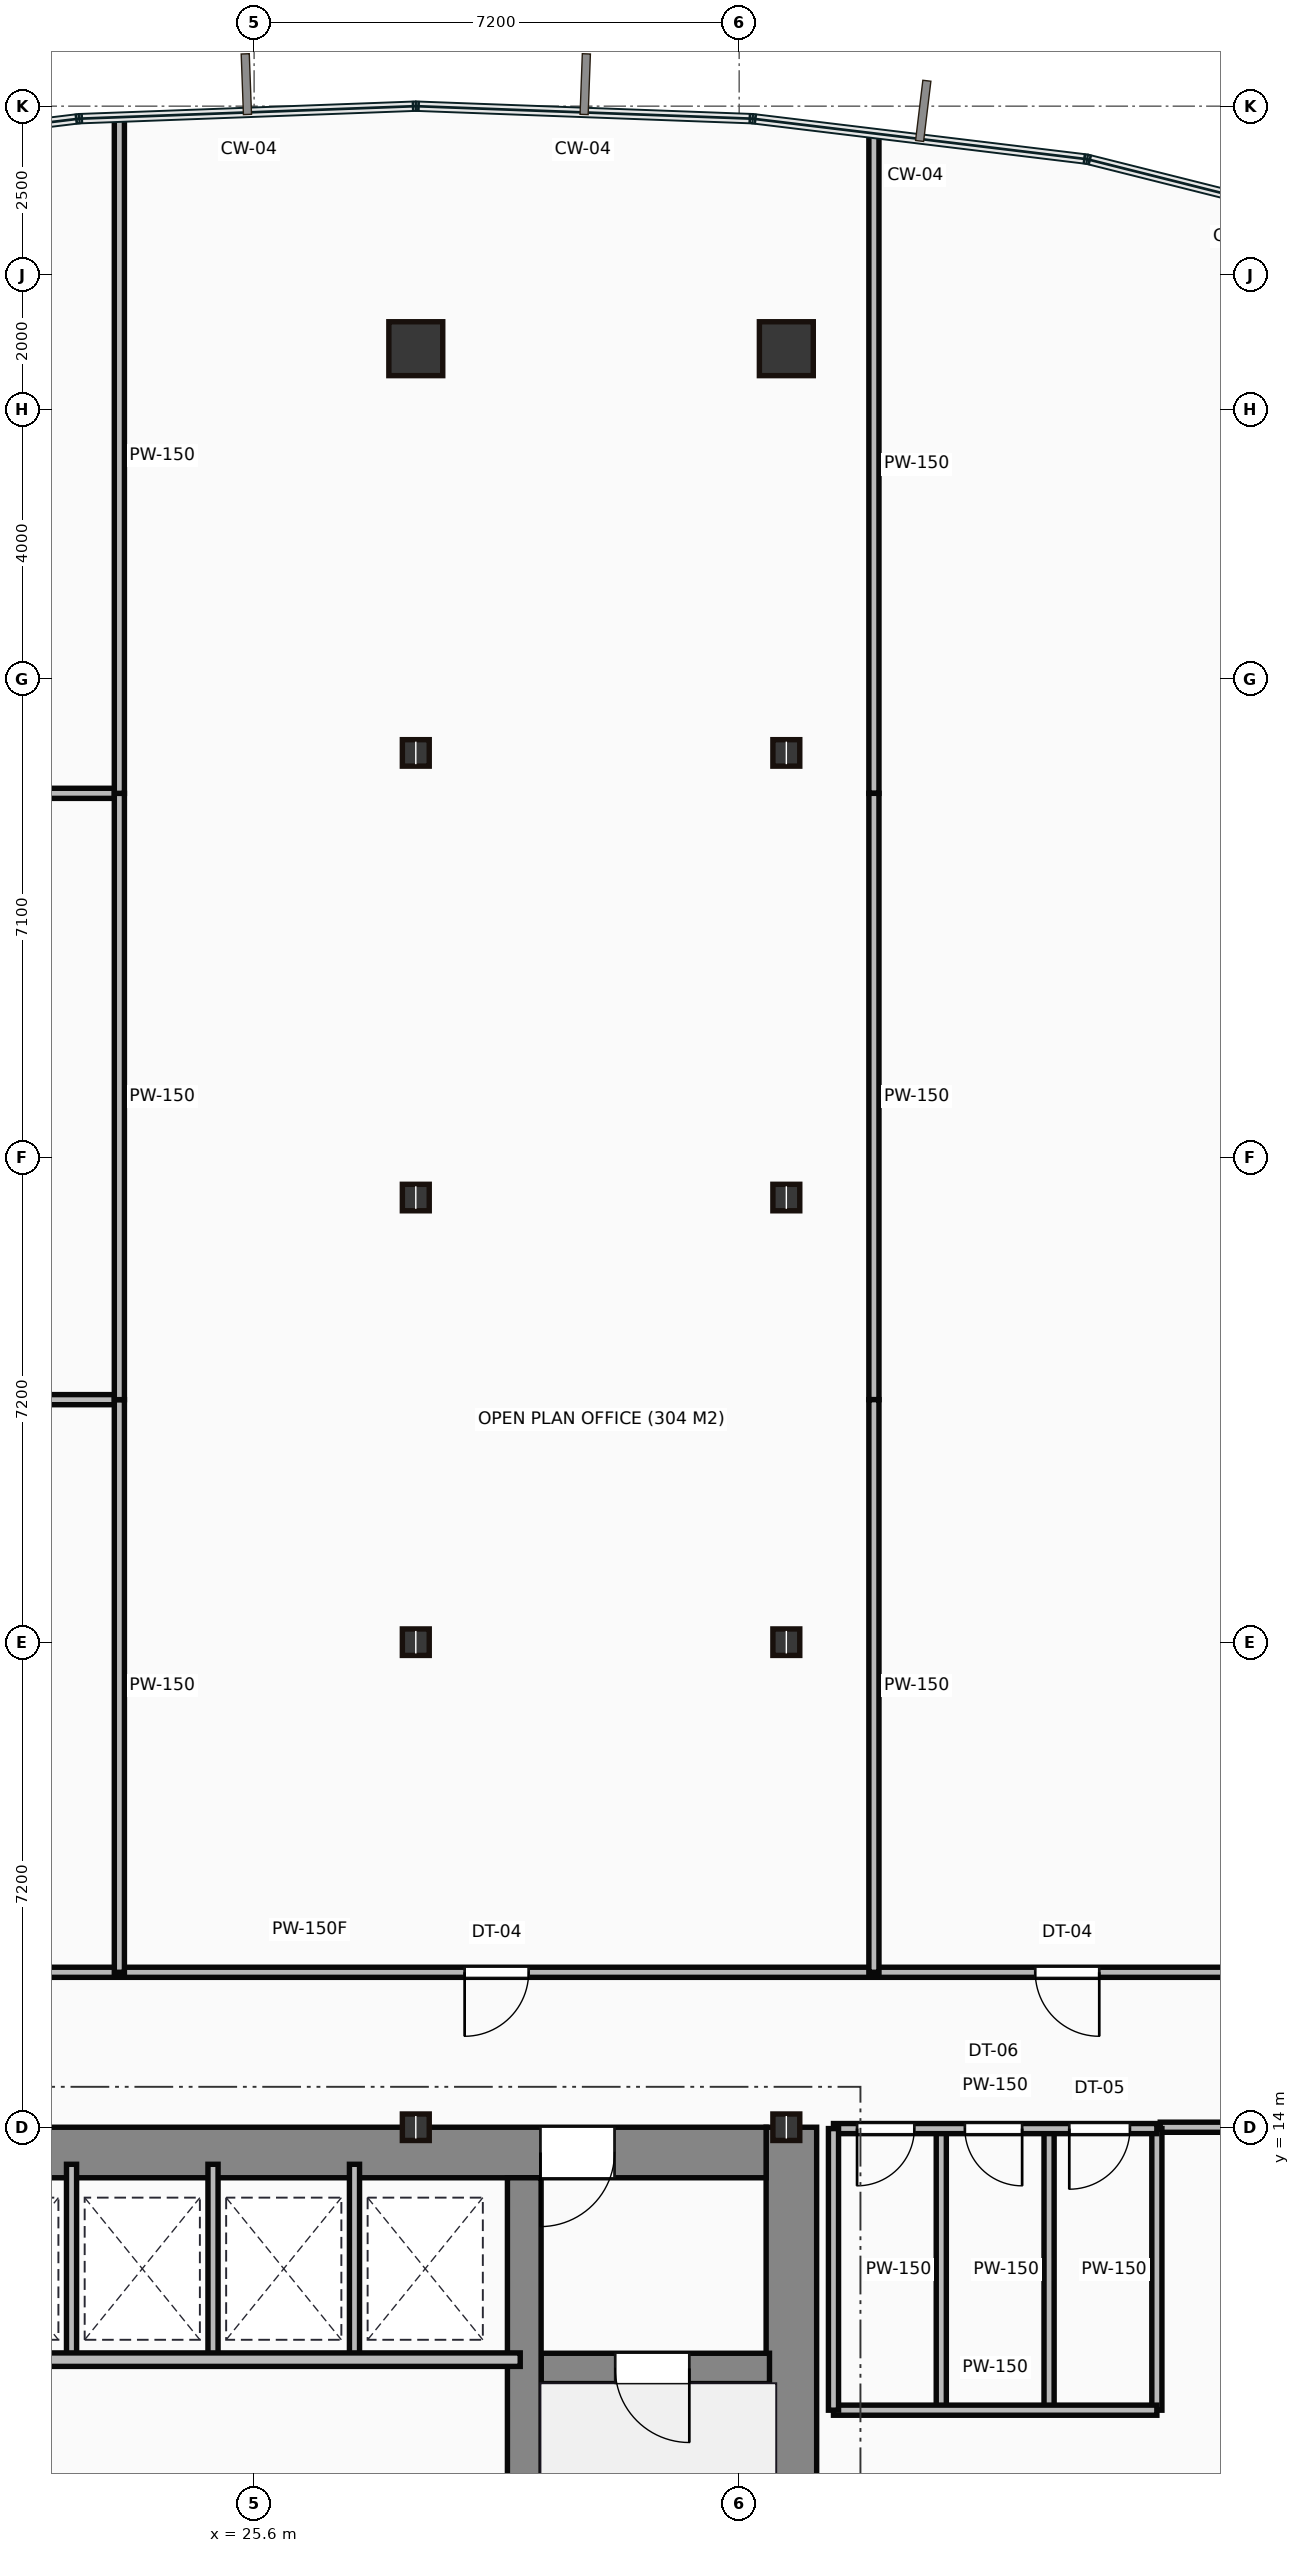
"""IFC4 building model, lengths in metres.
Left out: names, types, materials, properties, quantities, classifications, styles, units other than length and angle.
Written with IfcOpenShell. Run it as: python <this file> out.ifc"""

import sys

from ifc_helpers import new_model, si_unit, direction, frame, frame_2d, origin, origin_2d, place, context, subcontext, project, spatial, rectangle, hollow_rectangle, i_section, extrude, source, transform, mapped, element, fill, save


model = new_model("IFC4")
c1 = context("Model", 3, precision=1e-05, world=origin(), true_north=direction((0.0, 1.0)))
c2 = subcontext(c1, "Body", "Model", "MODEL_VIEW")
j1 = project(units=[si_unit("LENGTHUNIT", "METRE"), si_unit("PLANEANGLEUNIT", "RADIAN")], contexts=[c1])
p1 = place(None, origin())
s1 = spatial("IfcSite", under=j1, at=p1, CompositionType="ELEMENT")
p2 = place(p1, origin())
s2 = spatial("IfcBuilding", under=s1, at=p2, CompositionType="ELEMENT")
p3 = place(p2, frame((0.0, 0.0, 125.15)))
s3 = spatial("IfcBuildingStorey", under=s2, at=p3, CompositionType="ELEMENT", Elevation=125.15)
m1 = source(origin(), c2, "Body", "SweptSolid", [
    extrude(rectangle(XDim=13.1, YDim=0.75, at=frame_2d((6.55, 0.0))), origin(), (0.0, 0.0, 1.0), 3.65),
])
p4 = place(p3, frame((33.575, 0.9, 0.0), z_axis=(0.0, 0.0, 1.0), x_axis=(0.0, 1.0, 0.0)))
e1 = element("IfcWall", 1, at=p4, inside=s3, PredefinedType="SHEAR", context=c2, shape_type="MappedRepresentation", body=[
    mapped(m1, transform((0.0, 0.0, 0.0))),
])
m2 = source(origin(), c2, "Body", "SweptSolid", [
    extrude(rectangle(XDim=12.6, YDim=0.75, at=frame_2d((6.3, 0.0))), origin(), (0.0, 0.0, 1.0), 3.65),
])
p5 = place(p3, frame((20.6, 13.625, 0.0), z_axis=(0.0, 0.0, 1.0), x_axis=(1.0, 0.0, 0.0)))
e2 = element("IfcWall", 2, at=p5, inside=s3, PredefinedType="SHEAR", context=c2, shape_type="MappedRepresentation", body=[
    mapped(m2, transform((0.0, 0.0, 0.0))),
])
p6 = place(p5, frame((9.25, 0.0, 0.0)))
e3 = element("IfcOpeningElement", 3, at=p6, cuts=e2, PredefinedType="OPENING", context=c2, shape_type="SweptSolid", body=[
    extrude(rectangle(XDim=1.1, YDim=2.15, at=frame_2d((0.55, 1.075))), frame((0.0, 0.385, 0.0), z_axis=(0.0, -1.0, 0.0), x_axis=(1.0, 0.0, 0.0)), (0.0, 0.0, 1.0), 0.77),
])
m3 = source(origin(), c2, "Body", "SweptSolid", [
    extrude(rectangle(XDim=12.35, YDim=0.5, at=frame_2d((6.175, 0.0))), origin(), (0.0, 0.0, 1.0), 3.65),
])
p7 = place(p3, frame((29.61, 0.9, 0.0), z_axis=(0.0, 0.0, 1.0), x_axis=(0.0, 1.0, 0.0)))
e4 = element("IfcWall", 4, at=p7, inside=s3, PredefinedType="SHEAR", context=c2, shape_type="MappedRepresentation", body=[
    mapped(m3, transform((0.0, 0.0, 0.0))),
])
m4 = source(origin(), c2, "Body", "SweptSolid", [
    extrude(rectangle(XDim=3.39, YDim=0.45, at=frame_2d((1.695, 0.0))), origin(), (0.0, 0.0, 1.0), 3.65),
])
p8 = place(p3, frame((29.86, 10.42, 0.0), z_axis=(0.0, 0.0, 1.0), x_axis=(1.0, 0.0, 0.0)))
e5 = element("IfcWall", 5, at=p8, inside=s3, PredefinedType="SHEAR", context=c2, shape_type="MappedRepresentation", body=[
    mapped(m4, transform((0.0, 0.0, 0.0))),
])
p9 = place(p8, frame((1.1, 0.0, 0.0)))
e6 = element("IfcOpeningElement", 6, at=p9, cuts=e5, PredefinedType="OPENING", context=c2, shape_type="SweptSolid", body=[
    extrude(rectangle(XDim=1.1, YDim=2.15, at=frame_2d((0.55, 1.075))), frame((0.0, 0.235, 0.0), z_axis=(0.0, -1.0, 0.0), x_axis=(1.0, 0.0, 0.0)), (0.0, 0.0, 1.0), 0.47),
])
m5 = source(origin(), c2, "Body", "SweptSolid", [
    extrude(i_section(OverallWidth=0.399, OverallDepth=0.393, WebThickness=0.023, FlangeThickness=0.037, at=origin_2d()), origin(), (0.0, 0.0, 1.0), 3.65),
])
for number, where, z_axis, x_axis in (
    (7, (28.0, 14.0, 0.0), (0.0, 0.0, 1.0), (1.0, 0.0, 0.0)),
    (8, (28.0, 21.2, 0.0), (0.0, 0.0, 1.0), (1.0, 0.0, 0.0)),
    (9, (28.0, 27.8, 0.0), (0.0, 0.0, 1.0), (1.0, 0.0, 0.0)),
    (10, (28.0, 34.4, 0.0), (0.0, 0.0, 1.0), (1.0, 0.0, 0.0)),
):
    element("IfcColumn", number, at=place(p3, frame(where, z_axis=z_axis, x_axis=x_axis)), inside=s3, PredefinedType="COLUMN", context=c2, shape_type="MappedRepresentation", body=[
        mapped(m5, transform((0.0, 0.0, 0.0))),
    ])
m6 = source(origin(), c2, "Body", "SweptSolid", [
    extrude(hollow_rectangle(XDim=0.8, YDim=0.8, WallThickness=0.04, at=origin_2d()), origin(), (0.0, 0.0, 1.0), 3.65),
])
p10 = place(p3, frame((28.0, 40.4, 0.0), z_axis=(0.0, 0.0, 1.0), x_axis=(1.0, 0.0, 0.0)))
e11 = element("IfcColumn", 11, at=p10, inside=s3, PredefinedType="COLUMN", context=c2, shape_type="MappedRepresentation", body=[
    mapped(m6, transform((0.0, 0.0, 0.0))),
])
for number, where, z_axis, x_axis in (
    (12, (33.5, 14.0, 0.0), (0.0, 0.0, 1.0), (1.0, 0.0, 0.0)),
    (13, (33.5, 21.2, 0.0), (0.0, 0.0, 1.0), (1.0, 0.0, 0.0)),
    (14, (33.5, 27.8, 0.0), (0.0, 0.0, 1.0), (1.0, 0.0, 0.0)),
    (15, (33.5, 34.4, 0.0), (0.0, 0.0, 1.0), (1.0, 0.0, 0.0)),
):
    element("IfcColumn", number, at=place(p3, frame(where, z_axis=z_axis, x_axis=x_axis)), inside=s3, PredefinedType="COLUMN", context=c2, shape_type="MappedRepresentation", body=[
        mapped(m5, transform((0.0, 0.0, 0.0))),
    ])
p11 = place(p3, frame((33.5, 40.4, 0.0), z_axis=(0.0, 0.0, 1.0), x_axis=(1.0, 0.0, 0.0)))
e16 = element("IfcColumn", 16, at=p11, inside=s3, PredefinedType="COLUMN", context=c2, shape_type="MappedRepresentation", body=[
    mapped(m6, transform((0.0, 0.0, 0.0))),
])
m7 = source(origin(), c2, "Body", "SweptSolid", [
    extrude(rectangle(XDim=8.8, YDim=0.2, at=frame_2d((4.4, 0.0))), origin(), (0.0, 0.0, 1.0), 3.4),
])
p12 = place(p3, frame((20.75, 10.55, 0.0), z_axis=(0.0, 0.0, 1.0), x_axis=(1.0, 0.0, 0.0)))
e17 = element("IfcWall", 17, at=p12, inside=s3, PredefinedType="PARTITIONING", context=c2, shape_type="MappedRepresentation", body=[
    mapped(m7, transform((0.0, 0.0, 0.0))),
])
m8 = source(origin(), c2, "Body", "SweptSolid", [
    extrude(rectangle(XDim=2.85, YDim=0.15, at=frame_2d((1.425, 0.0))), origin(), (0.0, 0.0, 1.0), 3.4),
])
for number, where, z_axis, x_axis in (
    (18, (22.89, 10.6, 0.0), (0.0, 0.0, 1.0), (0.0, 1.0, 0.0)),
    (19, (24.99, 10.6, 0.0), (0.0, 0.0, 1.0), (0.0, 1.0, 0.0)),
    (20, (27.09, 10.6, 0.0), (0.0, 0.0, 1.0), (0.0, 1.0, 0.0)),
):
    element("IfcWall", number, at=place(p3, frame(where, z_axis=z_axis, x_axis=x_axis)), inside=s3, PredefinedType="PARTITIONING", context=c2, shape_type="MappedRepresentation", body=[
        mapped(m8, transform((0.0, 0.0, 0.0))),
    ])
m9 = source(origin(), c2, "Body", "SweptSolid", [
    extrude(rectangle(XDim=4.8, YDim=0.15, at=frame_2d((2.4, 0.0))), origin(), (0.0, 0.0, 1.0), 2.702),
])
p13 = place(p3, frame((34.2, 13.98, 0.0), z_axis=(0.0, 0.0, 1.0), x_axis=(1.0, 0.0, 0.0)))
e21 = element("IfcWall", 21, at=p13, inside=s3, PredefinedType="PARTITIONING", context=c2, shape_type="MappedRepresentation", body=[
    mapped(m9, transform((0.0, 0.0, 0.0))),
])
p14 = place(p13, frame((0.35, 0.0, 0.0)))
e22 = element("IfcOpeningElement", 22, at=p14, cuts=e21, PredefinedType="OPENING", context=c2, shape_type="SweptSolid", body=[
    extrude(rectangle(XDim=0.85, YDim=2.1, at=frame_2d((0.425, 1.05))), frame((0.0, 0.085, 0.0), z_axis=(0.0, -1.0, 0.0), x_axis=(1.0, 0.0, 0.0)), (0.0, 0.0, 1.0), 0.17),
])
p15 = place(p13, frame((1.95, 0.0, 0.0)))
e23 = element("IfcOpeningElement", 23, at=p15, cuts=e21, PredefinedType="OPENING", context=c2, shape_type="SweptSolid", body=[
    extrude(rectangle(XDim=0.85, YDim=2.1, at=frame_2d((0.425, 1.05))), frame((0.0, 0.085, 0.0), z_axis=(0.0, -1.0, 0.0), x_axis=(1.0, 0.0, 0.0)), (0.0, 0.0, 1.0), 0.17),
])
p16 = place(p13, frame((3.5, 0.0, 0.0)))
e24 = element("IfcOpeningElement", 24, at=p16, cuts=e21, PredefinedType="OPENING", context=c2, shape_type="SweptSolid", body=[
    extrude(rectangle(XDim=0.9, YDim=2.1, at=frame_2d((0.45, 1.05))), frame((0.0, 0.085, 0.0), z_axis=(0.0, -1.0, 0.0), x_axis=(1.0, 0.0, 0.0)), (0.0, 0.0, 1.0), 0.17),
])
m10 = source(origin(), c2, "Body", "SweptSolid", [
    extrude(rectangle(XDim=4.8, YDim=0.15, at=frame_2d((2.4, 0.0))), origin(), (0.0, 0.0, 1.0), 3.4),
])
p17 = place(p3, frame((34.2, 9.8, 0.0), z_axis=(0.0, 0.0, 1.0), x_axis=(1.0, 0.0, 0.0)))
e25 = element("IfcWall", 25, at=p17, inside=s3, PredefinedType="PARTITIONING", context=c2, shape_type="MappedRepresentation", body=[
    mapped(m10, transform((0.0, 0.0, 0.0))),
])
m11 = source(origin(), c2, "Body", "SweptSolid", [
    extrude(rectangle(XDim=4.18, YDim=0.15, at=frame_2d((2.09, 0.0))), origin(), (0.0, 0.0, 1.0), 3.4),
])
for number, where, z_axis, x_axis in (
    (26, (39.0, 9.8, 0.0), (0.0, 0.0, 1.0), (0.0, 1.0, 0.0)),
    (27, (34.2, 9.8, 0.0), (0.0, 0.0, 1.0), (0.0, 1.0, 0.0)),
    (28, (35.8, 9.8, 0.0), (0.0, 0.0, 1.0), (0.0, 1.0, 0.0)),
    (29, (37.4, 9.8, 0.0), (0.0, 0.0, 1.0), (0.0, 1.0, 0.0)),
):
    element("IfcWall", number, at=place(p3, frame(where, z_axis=z_axis, x_axis=x_axis)), inside=s3, PredefinedType="PARTITIONING", context=c2, shape_type="MappedRepresentation", body=[
        mapped(m11, transform((0.0, 0.0, 0.0))),
    ])
m12 = source(origin(), c2, "Body", "SweptSolid", [
    extrude(rectangle(XDim=28.75, YDim=0.15, at=frame_2d((14.375, 0.0))), origin(), (0.0, 0.0, 1.0), 3.4),
])
p18 = place(p3, frame((12.05, 16.3, 0.0), z_axis=(0.0, 0.0, 1.0), x_axis=(1.0, 0.0, 0.0)))
e30 = element("IfcWall", 30, at=p18, inside=s3, PredefinedType="PARTITIONING", context=c2, shape_type="MappedRepresentation", body=[
    mapped(m12, transform((0.0, 0.0, 0.0))),
])
p19 = place(p18, frame((5.43, 0.0, 0.0)))
e31 = element("IfcOpeningElement", 31, at=p19, cuts=e30, PredefinedType="OPENING", context=c2, shape_type="SweptSolid", body=[
    extrude(rectangle(XDim=0.95, YDim=2.15, at=frame_2d((0.475, 1.075))), frame((0.0, 0.085, 0.0), z_axis=(0.0, -1.0, 0.0), x_axis=(1.0, 0.0, 0.0)), (0.0, 0.0, 1.0), 0.17),
])
p20 = place(p18, frame((16.675, 0.0, 0.0)))
e32 = element("IfcOpeningElement", 32, at=p20, cuts=e30, PredefinedType="OPENING", context=c2, shape_type="SweptSolid", body=[
    extrude(rectangle(XDim=0.95, YDim=2.15, at=frame_2d((0.475, 1.075))), frame((0.0, 0.085, 0.0), z_axis=(0.0, -1.0, 0.0), x_axis=(1.0, 0.0, 0.0)), (0.0, 0.0, 1.0), 0.17),
])
p21 = place(p18, frame((25.145, 0.0, 0.0)))
e33 = element("IfcOpeningElement", 33, at=p21, cuts=e30, PredefinedType="OPENING", context=c2, shape_type="SweptSolid", body=[
    extrude(rectangle(XDim=0.95, YDim=2.15, at=frame_2d((0.475, 1.075))), frame((0.0, 0.085, 0.0), z_axis=(0.0, -1.0, 0.0), x_axis=(1.0, 0.0, 0.0)), (0.0, 0.0, 1.0), 0.17),
])
m13 = source(origin(), c2, "Body", "SweptSolid", [
    extrude(rectangle(XDim=1.75, YDim=0.15, at=frame_2d((0.875, 0.0))), origin(), (0.0, 0.0, 1.0), 2.702),
])
p22 = place(p3, frame((40.8, 14.0, 0.0), z_axis=(0.0, 0.0, 1.0), x_axis=(-1.0, 0.0, 0.0)))
e34 = element("IfcWall", 34, at=p22, inside=s3, PredefinedType="PARTITIONING", context=c2, shape_type="MappedRepresentation", body=[
    mapped(m13, transform((0.0, 0.0, 0.0))),
])
m14 = source(origin(), c2, "Body", "SweptSolid", [
    extrude(rectangle(XDim=11.55, YDim=0.15, at=frame_2d((5.775, 0.0))), origin(), (0.0, 0.0, 1.0), 3.4),
])
for number, where, z_axis, x_axis in (
    (35, (12.05, 24.8, 0.0), (0.0, 0.0, 1.0), (1.0, 0.0, 0.0)),
    (36, (23.6, 33.8, 0.0), (0.0, 0.0, 1.0), (-1.0, 0.0, 0.0)),
):
    element("IfcWall", number, at=place(p3, frame(where, z_axis=z_axis, x_axis=x_axis)), inside=s3, PredefinedType="PARTITIONING", context=c2, shape_type="MappedRepresentation", body=[
        mapped(m14, transform((0.0, 0.0, 0.0))),
    ])
m15 = source(origin(), c2, "Body", "SweptSolid", [
    extrude(rectangle(XDim=8.5, YDim=0.15, at=frame_2d((4.25, 0.0))), origin(), (0.0, 0.0, 1.0), 3.4),
])
p23 = place(p3, frame((23.6, 24.8, 0.0), z_axis=(0.0, 0.0, 1.0), x_axis=(0.0, -1.0, 0.0)))
e37 = element("IfcWall", 37, at=p23, inside=s3, PredefinedType="PARTITIONING", context=c2, shape_type="MappedRepresentation", body=[
    mapped(m15, transform((0.0, 0.0, 0.0))),
])
m16 = source(origin(), c2, "Body", "SweptSolid", [
    extrude(rectangle(XDim=9.0, YDim=0.15, at=frame_2d((4.5, 0.0))), origin(), (0.0, 0.0, 1.0), 3.4),
])
p24 = place(p3, frame((23.6, 33.8, 0.0), z_axis=(0.0, 0.0, 1.0), x_axis=(0.0, -1.0, 0.0)))
e38 = element("IfcWall", 38, at=p24, inside=s3, PredefinedType="PARTITIONING", context=c2, shape_type="MappedRepresentation", body=[
    mapped(m16, transform((0.0, 0.0, 0.0))),
])
m17 = source(origin(), c2, "Body", "SweptSolid", [
    extrude(rectangle(XDim=10.016, YDim=0.15, at=frame_2d((5.008, 0.0))), origin(), (0.0, 0.0, 1.0), 3.4),
])
p25 = place(p3, frame((23.6, 43.816, 0.0), z_axis=(0.0, 0.0, 1.0), x_axis=(0.0, -1.0, 0.0)))
e39 = element("IfcWall", 39, at=p25, inside=s3, PredefinedType="PARTITIONING", context=c2, shape_type="MappedRepresentation", body=[
    mapped(m17, transform((0.0, 0.0, 0.0))),
])
m18 = source(origin(), c2, "Body", "SweptSolid", [
    extrude(rectangle(XDim=9.776, YDim=0.15, at=frame_2d((4.888, 0.0))), origin(), (0.0, 0.0, 1.0), 3.4),
])
p26 = place(p3, frame((34.8, 43.576, 0.0), z_axis=(0.0, 0.0, 1.0), x_axis=(0.0, -1.0, 0.0)))
e40 = element("IfcWall", 40, at=p26, inside=s3, PredefinedType="PARTITIONING", context=c2, shape_type="MappedRepresentation", body=[
    mapped(m18, transform((0.0, 0.0, 0.0))),
])
p27 = place(p3, frame((34.8, 33.8, 0.0), z_axis=(0.0, 0.0, 1.0), x_axis=(0.0, -1.0, 0.0)))
e41 = element("IfcWall", 41, at=p27, inside=s3, PredefinedType="PARTITIONING", context=c2, shape_type="MappedRepresentation", body=[
    mapped(m16, transform((0.0, 0.0, 0.0))),
])
p28 = place(p3, frame((34.8, 24.8, 0.0), z_axis=(0.0, 0.0, 1.0), x_axis=(0.0, -1.0, 0.0)))
e42 = element("IfcWall", 42, at=p28, inside=s3, PredefinedType="PARTITIONING", context=c2, shape_type="MappedRepresentation", body=[
    mapped(m15, transform((0.0, 0.0, 0.0))),
])
m19 = source(origin(), c2, "Body", "SweptSolid", [
    extrude(rectangle(XDim=1.1, YDim=2.15, at=frame_2d((0.55, 1.075))), frame((0.0, 0.025, 0.0), z_axis=(0.0, -1.0, 0.0), x_axis=(1.0, 0.0, 0.0)), (0.0, 0.0, 1.0), 0.05),
])
p29 = place(p9, frame((1.1, 0.0, 0.0), z_axis=(0.0, 0.0, 1.0), x_axis=(-1.0, 0.0, 0.0)))
e43 = element("IfcDoor", 43, at=p29, inside=s3, OperationType="SINGLE_SWING_RIGHT", PredefinedType="DOOR", context=c2, shape_type="MappedRepresentation", body=[
    mapped(m19, transform((0.0, 0.0, 0.0))),
])
fill(e6, e43)
p30 = place(p6, origin())
e44 = element("IfcDoor", 44, at=p30, inside=s3, OperationType="SINGLE_SWING_LEFT", PredefinedType="DOOR", context=c2, shape_type="MappedRepresentation", body=[
    mapped(m19, transform((0.0, 0.0, 0.0))),
])
fill(e3, e44)
m20 = source(origin(), c2, "Body", "SweptSolid", [
    extrude(rectangle(XDim=0.85, YDim=2.1, at=frame_2d((0.425, 1.05))), frame((0.0, 0.025, 0.0), z_axis=(0.0, -1.0, 0.0), x_axis=(1.0, 0.0, 0.0)), (0.0, 0.0, 1.0), 0.05),
])
p31 = place(p14, frame((0.85, 0.0, 0.0), z_axis=(0.0, 0.0, 1.0), x_axis=(-1.0, 0.0, 0.0)))
e45 = element("IfcDoor", 45, at=p31, inside=s3, OperationType="SINGLE_SWING_LEFT", PredefinedType="DOOR", context=c2, shape_type="MappedRepresentation", body=[
    mapped(m20, transform((0.0, 0.0, 0.0))),
])
fill(e22, e45)
p32 = place(p15, frame((0.85, 0.0, 0.0), z_axis=(0.0, 0.0, 1.0), x_axis=(-1.0, 0.0, 0.0)))
e46 = element("IfcDoor", 46, at=p32, inside=s3, OperationType="SINGLE_SWING_RIGHT", PredefinedType="DOOR", context=c2, shape_type="MappedRepresentation", body=[
    mapped(m20, transform((0.0, 0.0, 0.0))),
])
fill(e23, e46)
m21 = source(origin(), c2, "Body", "SweptSolid", [
    extrude(rectangle(XDim=0.9, YDim=2.1, at=frame_2d((0.45, 1.05))), frame((0.0, 0.025, 0.0), z_axis=(0.0, -1.0, 0.0), x_axis=(1.0, 0.0, 0.0)), (0.0, 0.0, 1.0), 0.05),
])
p33 = place(p16, frame((0.9, 0.0, 0.0), z_axis=(0.0, 0.0, 1.0), x_axis=(-1.0, 0.0, 0.0)))
e47 = element("IfcDoor", 47, at=p33, inside=s3, OperationType="SINGLE_SWING_LEFT", PredefinedType="DOOR", context=c2, shape_type="MappedRepresentation", body=[
    mapped(m21, transform((0.0, 0.0, 0.0))),
])
fill(e24, e47)
m22 = source(origin(), c2, "Body", "SweptSolid", [
    extrude(rectangle(XDim=0.95, YDim=2.15, at=frame_2d((0.475, 1.075))), frame((0.0, 0.025, 0.0), z_axis=(0.0, -1.0, 0.0), x_axis=(1.0, 0.0, 0.0)), (0.0, 0.0, 1.0), 0.05),
])
p34 = place(p20, origin())
e48 = element("IfcDoor", 48, at=p34, inside=s3, OperationType="SINGLE_SWING_LEFT", PredefinedType="DOOR", context=c2, shape_type="MappedRepresentation", body=[
    mapped(m22, transform((0.0, 0.0, 0.0))),
])
fill(e32, e48)
p35 = place(p21, origin())
e49 = element("IfcDoor", 49, at=p35, inside=s3, OperationType="SINGLE_SWING_RIGHT", PredefinedType="DOOR", context=c2, shape_type="MappedRepresentation", body=[
    mapped(m22, transform((0.0, 0.0, 0.0))),
])
fill(e33, e49)
save(model, sys.argv[1])
